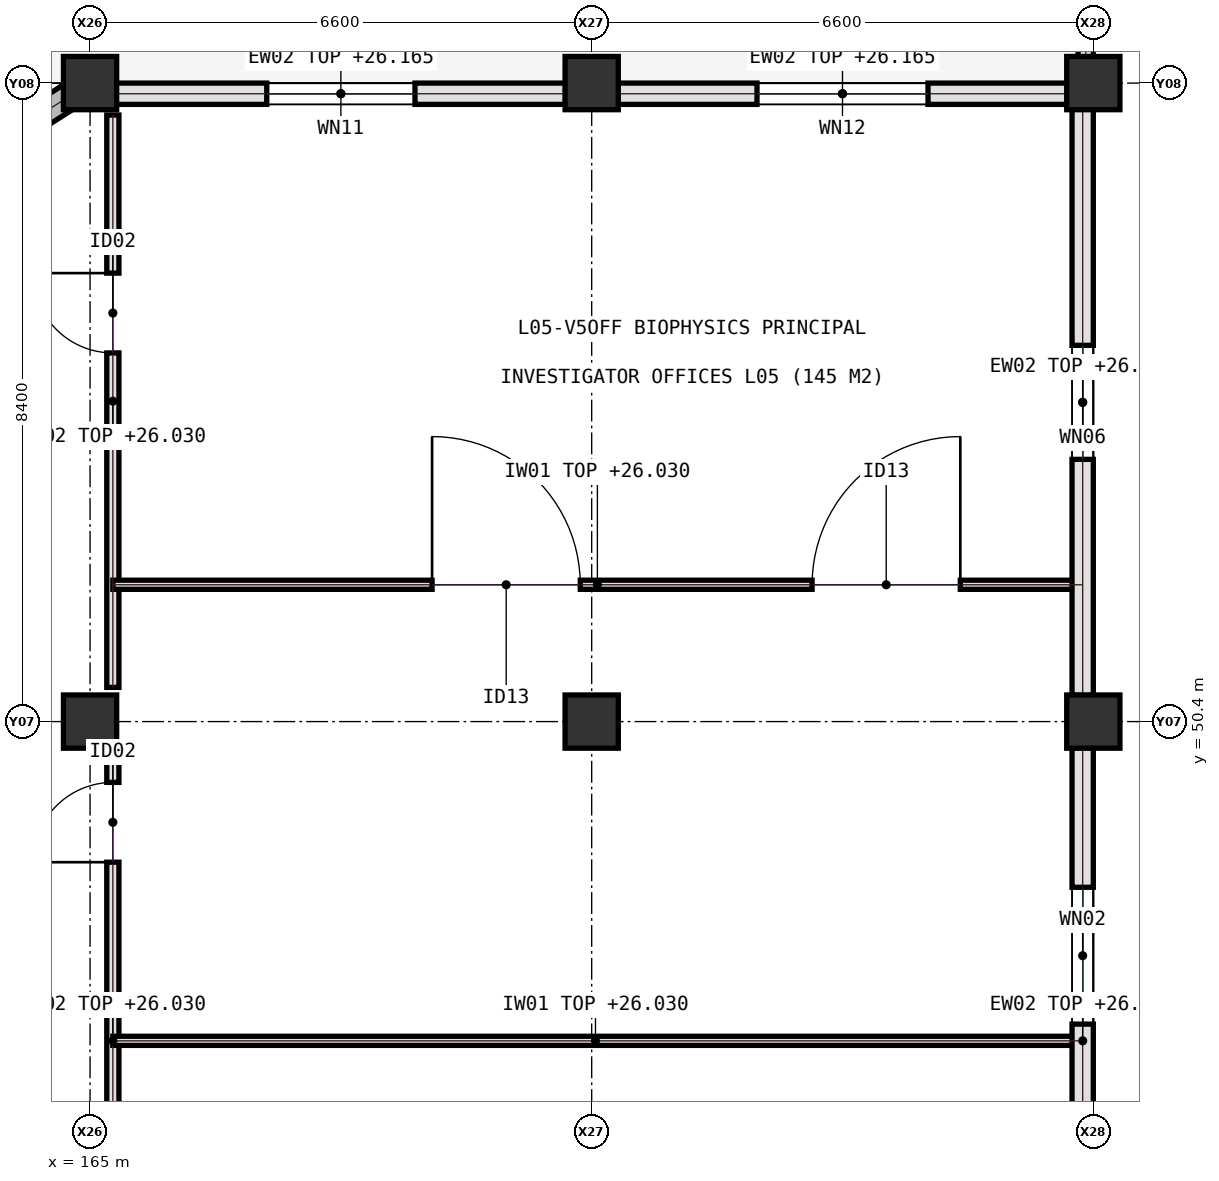
"""IFC4 building model, lengths in metres.
Left out: names, types, materials, properties, quantities, classifications, styles, units other than length and angle.
Written with IfcOpenShell. Run it as: python <this file> out.ifc"""

import sys

from ifc_helpers import new_model, si_unit, direction, frame, frame_2d, origin, origin_2d, place, context, subcontext, project, spatial, rectangle, extrude, element, fill, save


model = new_model("IFC4")
c1 = context("Model", 3, precision=1e-05, world=origin(), true_north=direction((0.0, 1.0)))
c2 = subcontext(c1, "Body", "Model", "MODEL_VIEW")
j1 = project(units=[si_unit("LENGTHUNIT", "METRE"), si_unit("PLANEANGLEUNIT", "RADIAN")], contexts=[c1])
p1 = place(None, origin())
s1 = spatial("IfcSite", under=j1, at=p1, CompositionType="ELEMENT")
p2 = place(p1, origin())
s2 = spatial("IfcBuilding", under=s1, at=p2, CompositionType="ELEMENT")
p3 = place(p2, frame((0.0, 0.0, 22.8)))
s3 = spatial("IfcBuildingStorey", under=s2, at=p3, CompositionType="ELEMENT", Elevation=22.8)
for number, where, z_axis, x_axis in (
    (1, (165.0, 50.4, 0.0), (0.0, 0.0, 1.0), (1.0, 0.0, 0.0)),
    (2, (165.0, 58.8, 0.0), (0.0, 0.0, 1.0), (1.0, 0.0, 0.0)),
    (3, (171.6, 50.4, 0.0), (0.0, 0.0, 1.0), (1.0, 0.0, 0.0)),
    (4, (171.6, 58.8, 0.0), (0.0, 0.0, 1.0), (1.0, 0.0, 0.0)),
    (5, (178.2, 50.4, 0.0), (0.0, 0.0, 1.0), (1.0, 0.0, 0.0)),
    (6, (178.2, 58.8, 0.0), (0.0, 0.0, 1.0), (1.0, 0.0, 0.0)),
):
    element("IfcColumn", number, at=place(p3, frame(where, z_axis=z_axis, x_axis=x_axis)), inside=s3, PredefinedType="COLUMN", context=c2, shape_type="SweptSolid", body=[
        extrude(rectangle(XDim=0.7, YDim=0.7, at=origin_2d()), origin(), (0.0, 0.0, 1.0), 4.2),
    ])
p4 = place(p3, frame((165.3, 42.45, 0.0), z_axis=(0.0, 0.0, 1.0), x_axis=(0.0, 1.0, 0.0)))
e7 = element("IfcWall", 7, at=p4, inside=s3, PredefinedType="PARTITIONING", context=c2, shape_type="SweptSolid", body=[
    extrude(rectangle(XDim=7.5, YDim=0.16, at=frame_2d((3.75, 0.0))), origin(), (0.0, 0.0, 1.0), 3.23),
])
p5 = place(p4, frame((0.4, 0.0, 0.0)))
e8 = element("IfcOpeningElement", 8, at=p5, cuts=e7, PredefinedType="OPENING", context=c2, shape_type="SweptSolid", body=[
    extrude(rectangle(XDim=1.05, YDim=2.15, at=frame_2d((0.525, 1.075))), frame((0.0, 0.09, 0.0), z_axis=(0.0, -1.0, 0.0), x_axis=(1.0, 0.0, 0.0)), (0.0, 0.0, 1.0), 0.18),
])
p6 = place(p4, frame((6.1, 0.0, 0.0)))
e9 = element("IfcOpeningElement", 9, at=p6, cuts=e7, PredefinedType="OPENING", context=c2, shape_type="SweptSolid", body=[
    extrude(rectangle(XDim=1.05, YDim=2.15, at=frame_2d((0.525, 1.075))), frame((0.0, 0.09, 0.0), z_axis=(0.0, -1.0, 0.0), x_axis=(1.0, 0.0, 0.0)), (0.0, 0.0, 1.0), 0.18),
])
p7 = place(p3, frame((165.3, 50.85, 0.0), z_axis=(0.0, 0.0, 1.0), x_axis=(0.0, 1.0, 0.0)))
e10 = element("IfcWall", 10, at=p7, inside=s3, PredefinedType="PARTITIONING", context=c2, shape_type="SweptSolid", body=[
    extrude(rectangle(XDim=7.53, YDim=0.16, at=frame_2d((3.765, 0.0))), origin(), (0.0, 0.0, 1.0), 3.23),
])
p8 = place(p7, frame((4.4, 0.0, 0.0)))
e11 = element("IfcOpeningElement", 11, at=p8, cuts=e10, PredefinedType="OPENING", context=c2, shape_type="SweptSolid", body=[
    extrude(rectangle(XDim=1.05, YDim=2.15, at=frame_2d((0.525, 1.075))), frame((0.0, 0.09, 0.0), z_axis=(0.0, -1.0, 0.0), x_axis=(1.0, 0.0, 0.0)), (0.0, 0.0, 1.0), 0.18),
])
p9 = place(p3, frame((165.3, 46.2, 0.0), z_axis=(0.0, 0.0, 1.0), x_axis=(1.0, 0.0, 0.0)))
e12 = element("IfcWall", 12, at=p9, inside=s3, PredefinedType="PARTITIONING", context=c2, shape_type="SweptSolid", body=[
    extrude(rectangle(XDim=12.7, YDim=0.12, at=frame_2d((6.35, 0.0))), origin(), (0.0, 0.0, 1.0), 3.23),
])
p10 = place(p3, frame((165.3, 52.2, 0.0), z_axis=(0.0, 0.0, 1.0), x_axis=(1.0, 0.0, 0.0)))
e13 = element("IfcWall", 13, at=p10, inside=s3, PredefinedType="PARTITIONING", context=c2, shape_type="SweptSolid", body=[
    extrude(rectangle(XDim=12.75, YDim=0.12, at=frame_2d((6.375, 0.0))), origin(), (0.0, 0.0, 1.0), 3.23),
])
p11 = place(p10, frame((4.2, 0.0, 0.0)))
e14 = element("IfcOpeningElement", 14, at=p11, cuts=e13, PredefinedType="OPENING", context=c2, shape_type="SweptSolid", body=[
    extrude(rectangle(XDim=1.95, YDim=2.35, at=frame_2d((0.975, 1.175))), frame((0.0, 0.07, 0.0), z_axis=(0.0, -1.0, 0.0), x_axis=(1.0, 0.0, 0.0)), (0.0, 0.0, 1.0), 0.14),
])
p12 = place(p10, frame((9.2, 0.0, 0.0)))
e15 = element("IfcOpeningElement", 15, at=p12, cuts=e13, PredefinedType="OPENING", context=c2, shape_type="SweptSolid", body=[
    extrude(rectangle(XDim=1.95, YDim=2.35, at=frame_2d((0.975, 1.175))), frame((0.0, 0.07, 0.0), z_axis=(0.0, -1.0, 0.0), x_axis=(1.0, 0.0, 0.0)), (0.0, 0.0, 1.0), 0.14),
])
p13 = place(p3, frame((171.255, 58.66, 0.0), z_axis=(0.0, 0.0, 1.0), x_axis=(-1.0, 0.0, 0.0)))
e16 = element("IfcWall", 16, at=p13, inside=s3, PredefinedType="SOLIDWALL", context=c2, shape_type="SweptSolid", body=[
    extrude(rectangle(XDim=5.91, YDim=0.28, at=frame_2d((2.955, 0.0))), origin(), (0.0, 0.0, 1.0), 3.365),
])
p14 = place(p13, frame((1.98, 0.0, 0.95)))
e17 = element("IfcOpeningElement", 17, at=p14, cuts=e16, PredefinedType="OPENING", context=c2, shape_type="SweptSolid", body=[
    extrude(rectangle(XDim=1.95, YDim=1.55, at=frame_2d((0.975, 0.775))), frame((0.0, 0.15, 0.0), z_axis=(0.0, -1.0, 0.0), x_axis=(1.0, 0.0, 0.0)), (0.0, 0.0, 1.0), 0.3),
])
p15 = place(p3, frame((178.06, 42.345, 0.0), z_axis=(0.0, 0.0, 1.0), x_axis=(0.0, 1.0, 0.0)))
e18 = element("IfcWall", 18, at=p15, inside=s3, PredefinedType="SOLIDWALL", context=c2, shape_type="SweptSolid", body=[
    extrude(rectangle(XDim=7.71, YDim=0.28, at=frame_2d((3.855, 0.0))), origin(), (0.0, 0.0, 1.0), 3.415),
])
p16 = place(p15, frame((4.075, 0.0, 0.95)))
e19 = element("IfcOpeningElement", 19, at=p16, cuts=e18, PredefinedType="OPENING", context=c2, shape_type="SweptSolid", body=[
    extrude(rectangle(XDim=1.8, YDim=1.6, at=frame_2d((0.9, 0.8))), frame((0.0, 0.15, 0.0), z_axis=(0.0, -1.0, 0.0), x_axis=(1.0, 0.0, 0.0)), (0.0, 0.0, 1.0), 0.3),
])
p17 = place(p3, frame((178.06, 50.745, 0.0), z_axis=(0.0, 0.0, 1.0), x_axis=(0.0, 1.0, 0.0)))
e20 = element("IfcWall", 20, at=p17, inside=s3, PredefinedType="SOLIDWALL", context=c2, shape_type="SweptSolid", body=[
    extrude(rectangle(XDim=7.71, YDim=0.28, at=frame_2d((3.855, 0.0))), origin(), (0.0, 0.0, 1.0), 3.265),
])
p18 = place(p17, frame((3.105, 0.0, 0.95)))
e21 = element("IfcOpeningElement", 21, at=p18, cuts=e20, PredefinedType="OPENING", context=c2, shape_type="SweptSolid", body=[
    extrude(rectangle(XDim=1.5, YDim=2.1, at=frame_2d((0.75, 1.05))), frame((0.0, 0.15, 0.0), z_axis=(0.0, -1.0, 0.0), x_axis=(1.0, 0.0, 0.0)), (0.0, 0.0, 1.0), 0.3),
])
p19 = place(p3, frame((177.855, 58.66, 0.0), z_axis=(0.0, 0.0, 1.0), x_axis=(-1.0, 0.0, 0.0)))
e22 = element("IfcWall", 22, at=p19, inside=s3, PredefinedType="SOLIDWALL", context=c2, shape_type="SweptSolid", body=[
    extrude(rectangle(XDim=5.91, YDim=0.28, at=frame_2d((2.955, 0.0))), origin(), (0.0, 0.0, 1.0), 3.365),
])
p20 = place(p19, frame((1.83, 0.0, 0.95)))
e23 = element("IfcOpeningElement", 23, at=p20, cuts=e22, PredefinedType="OPENING", context=c2, shape_type="SweptSolid", body=[
    extrude(rectangle(XDim=2.25, YDim=1.55, at=frame_2d((1.125, 0.775))), frame((0.0, 0.15, 0.0), z_axis=(0.0, -1.0, 0.0), x_axis=(1.0, 0.0, 0.0)), (0.0, 0.0, 1.0), 0.3),
])
p21 = place(p3, frame((158.65, 54.76, 0.0), z_axis=(0.0, 0.0, 1.0), x_axis=(0.843786613851, 0.536678814829, 0.0)))
e24 = element("IfcWall", 24, at=p21, inside=s3, PredefinedType="SHEAR", context=c2, shape_type="SweptSolid", body=[
    extrude(rectangle(XDim=7.229, YDim=0.34, at=frame_2d((3.615, 0.0))), origin(), (0.0, 0.0, 1.0), 3.98),
])
p22 = place(p3, frame((178.1, 58.9, 0.0), z_axis=(0.0, 0.0, 1.0), x_axis=(0.0, 1.0, 0.0)))
e25 = element("IfcWall", 25, at=p22, inside=s3, PredefinedType="PARAPET", context=c2, shape_type="SweptSolid", body=[
    extrude(rectangle(XDim=8.2, YDim=0.2, at=frame_2d((4.1, 0.0))), origin(), (0.0, 0.0, 1.0), 1.1),
])
p23 = place(p6, origin())
e26 = element("IfcDoor", 26, at=p23, inside=s3, OperationType="SINGLE_SWING_LEFT", PredefinedType="DOOR", context=c2, shape_type="SweptSolid", body=[
    extrude(rectangle(XDim=1.05, YDim=2.15, at=frame_2d((0.525, 1.075))), frame((0.0, 0.025, 0.0), z_axis=(0.0, -1.0, 0.0), x_axis=(1.0, 0.0, 0.0)), (0.0, 0.0, 1.0), 0.05),
])
fill(e9, e26)
p24 = place(p8, origin())
e27 = element("IfcDoor", 27, at=p24, inside=s3, OperationType="SINGLE_SWING_RIGHT", PredefinedType="DOOR", context=c2, shape_type="SweptSolid", body=[
    extrude(rectangle(XDim=1.05, YDim=2.15, at=frame_2d((0.525, 1.075))), frame((0.0, 0.025, 0.0), z_axis=(0.0, -1.0, 0.0), x_axis=(1.0, 0.0, 0.0)), (0.0, 0.0, 1.0), 0.05),
])
fill(e11, e27)
p25 = place(p11, origin())
e28 = element("IfcDoor", 28, at=p25, inside=s3, OperationType="SINGLE_SWING_LEFT", PredefinedType="DOOR", context=c2, shape_type="SweptSolid", body=[
    extrude(rectangle(XDim=1.95, YDim=2.35, at=frame_2d((0.975, 1.175))), frame((0.0, 0.025, 0.0), z_axis=(0.0, -1.0, 0.0), x_axis=(1.0, 0.0, 0.0)), (0.0, 0.0, 1.0), 0.05),
])
fill(e14, e28)
p26 = place(p12, origin())
e29 = element("IfcDoor", 29, at=p26, inside=s3, OperationType="SINGLE_SWING_RIGHT", PredefinedType="DOOR", context=c2, shape_type="SweptSolid", body=[
    extrude(rectangle(XDim=1.95, YDim=2.35, at=frame_2d((0.975, 1.175))), frame((0.0, 0.025, 0.0), z_axis=(0.0, -1.0, 0.0), x_axis=(1.0, 0.0, 0.0)), (0.0, 0.0, 1.0), 0.05),
])
fill(e15, e29)
p27 = place(p14, origin())
e30 = element("IfcWindow", 30, at=p27, inside=s3, PartitioningType="SINGLE_PANEL", PredefinedType="WINDOW", context=c2, shape_type="SweptSolid", body=[
    extrude(rectangle(XDim=1.95, YDim=1.55, at=frame_2d((0.975, 0.775))), frame((0.0, 0.03, 0.0), z_axis=(0.0, -1.0, 0.0), x_axis=(1.0, 0.0, 0.0)), (0.0, 0.0, 1.0), 0.06),
])
fill(e17, e30)
p28 = place(p16, origin())
e31 = element("IfcWindow", 31, at=p28, inside=s3, PartitioningType="SINGLE_PANEL", PredefinedType="WINDOW", context=c2, shape_type="SweptSolid", body=[
    extrude(rectangle(XDim=1.8, YDim=1.6, at=frame_2d((0.9, 0.8))), frame((0.0, 0.03, 0.0), z_axis=(0.0, -1.0, 0.0), x_axis=(1.0, 0.0, 0.0)), (0.0, 0.0, 1.0), 0.06),
])
fill(e19, e31)
p29 = place(p18, origin())
e32 = element("IfcWindow", 32, at=p29, inside=s3, PartitioningType="SINGLE_PANEL", PredefinedType="WINDOW", context=c2, shape_type="SweptSolid", body=[
    extrude(rectangle(XDim=1.5, YDim=2.1, at=frame_2d((0.75, 1.05))), frame((0.0, 0.03, 0.0), z_axis=(0.0, -1.0, 0.0), x_axis=(1.0, 0.0, 0.0)), (0.0, 0.0, 1.0), 0.06),
])
fill(e21, e32)
p30 = place(p20, origin())
e33 = element("IfcWindow", 33, at=p30, inside=s3, PartitioningType="SINGLE_PANEL", PredefinedType="WINDOW", context=c2, shape_type="SweptSolid", body=[
    extrude(rectangle(XDim=2.25, YDim=1.55, at=frame_2d((1.125, 0.775))), frame((0.0, 0.03, 0.0), z_axis=(0.0, -1.0, 0.0), x_axis=(1.0, 0.0, 0.0)), (0.0, 0.0, 1.0), 0.06),
])
fill(e23, e33)
save(model, sys.argv[1])
